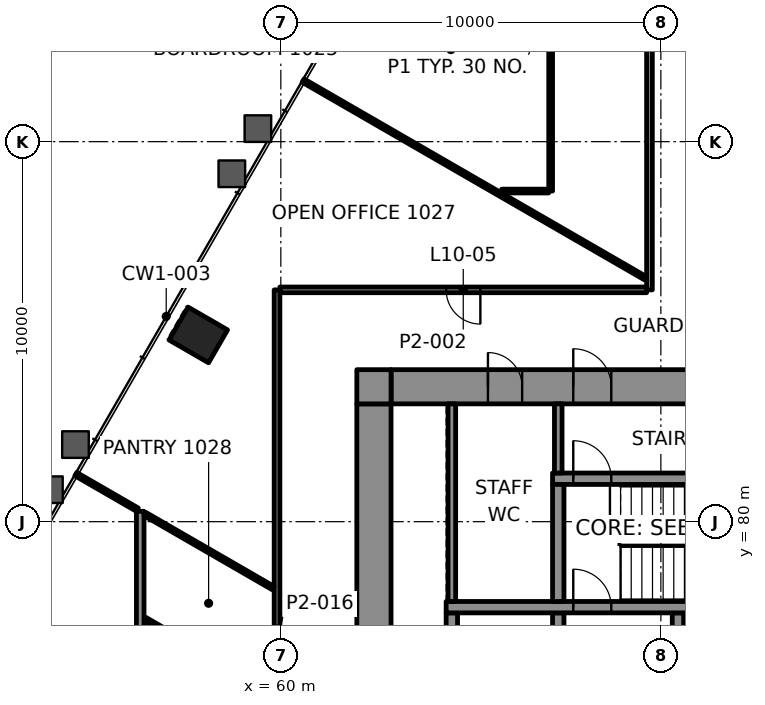
"""IFC4 building model, lengths in metres.
Left out: names, types, materials, properties, quantities, classifications, styles, units other than length and angle.
Written with IfcOpenShell. Run it as: python <this file> out.ifc"""

import sys

from ifc_helpers import new_model, si_unit, direction, frame, frame_2d, origin, origin_2d, place, context, subcontext, project, spatial, rectangle, extrude, element, fill, save


model = new_model("IFC4")
c1 = context("Model", 3, precision=1e-05, world=origin(), true_north=direction((0.0, 1.0)))
c2 = subcontext(c1, "Body", "Model", "MODEL_VIEW")
j1 = project(units=[si_unit("LENGTHUNIT", "METRE"), si_unit("PLANEANGLEUNIT", "RADIAN")], contexts=[c1])
p1 = place(None, origin())
s1 = spatial("IfcSite", under=j1, at=p1, CompositionType="ELEMENT")
p2 = place(p1, origin())
s2 = spatial("IfcBuilding", under=s1, at=p2, CompositionType="ELEMENT")
p3 = place(p2, frame((0.0, 0.0, 48.4)))
s3 = spatial("IfcBuildingStorey", under=s2, at=p3, CompositionType="ELEMENT", Elevation=48.4)
p4 = place(p3, frame((57.829, 84.914, -0.0), z_axis=(0.0, 0.0, 1.0), x_axis=(-0.5, -0.866025403784, 0.0)))
e1 = element("IfcColumn", 1, at=p4, inside=s3, PredefinedType="COLUMN", context=c2, shape_type="SweptSolid", body=[
    extrude(rectangle(XDim=1.0, YDim=1.2, at=origin_2d()), origin(), (0.0, 0.0, 1.0), 4.2),
])
p5 = place(p3, frame((62.9, 83.55, 0.0), z_axis=(0.0, 0.0, 1.0), x_axis=(1.0, 0.0, 0.0)))
e2 = element("IfcWall", 2, at=p5, inside=s3, PredefinedType="SHEAR", context=c2, shape_type="SweptSolid", body=[
    extrude(rectangle(XDim=25.1, YDim=0.9, at=frame_2d((12.55, 0.0))), origin(), (0.0, 0.0, 1.0), 4.0),
])
p6 = place(p5, frame((4.795, 0.0, 0.0)))
e3 = element("IfcOpeningElement", 3, at=p6, cuts=e2, PredefinedType="OPENING", context=c2, shape_type="SweptSolid", body=[
    extrude(rectangle(XDim=1.0, YDim=2.1, at=frame_2d((0.5, 1.05))), frame((0.0, 0.46, 0.0), z_axis=(0.0, -1.0, 0.0), x_axis=(1.0, 0.0, 0.0)), (0.0, 0.0, 1.0), 0.92),
])
p7 = place(p5, frame((18.605, 0.0, 0.0)))
e4 = element("IfcOpeningElement", 4, at=p7, cuts=e2, PredefinedType="OPENING", context=c2, shape_type="SweptSolid", body=[
    extrude(rectangle(XDim=1.0, YDim=2.1, at=frame_2d((0.5, 1.05))), frame((0.0, 0.46, 0.0), z_axis=(0.0, -1.0, 0.0), x_axis=(1.0, 0.0, 0.0)), (0.0, 0.0, 1.0), 0.92),
])
p8 = place(p5, frame((2.55, 0.0, 0.0)))
e5 = element("IfcOpeningElement", 5, at=p8, cuts=e2, PredefinedType="OPENING", context=c2, shape_type="SweptSolid", body=[
    extrude(rectangle(XDim=0.9, YDim=2.1, at=frame_2d((0.45, 1.05))), frame((0.0, 0.46, 0.0), z_axis=(0.0, -1.0, 0.0), x_axis=(1.0, 0.0, 0.0)), (0.0, 0.0, 1.0), 0.92),
])
p9 = place(p5, frame((11.75, 0.0, 0.0)))
e6 = element("IfcOpeningElement", 6, at=p9, cuts=e2, PredefinedType="OPENING", context=c2, shape_type="SweptSolid", body=[
    extrude(rectangle(XDim=0.9, YDim=2.1, at=frame_2d((0.45, 1.05))), frame((0.0, 0.46, 0.0), z_axis=(0.0, -1.0, 0.0), x_axis=(1.0, 0.0, 0.0)), (0.0, 0.0, 1.0), 0.92),
])
p10 = place(p5, frame((21.65, 0.0, 0.0)))
e7 = element("IfcOpeningElement", 7, at=p10, cuts=e2, PredefinedType="OPENING", context=c2, shape_type="SweptSolid", body=[
    extrude(rectangle(XDim=0.9, YDim=2.1, at=frame_2d((0.45, 1.05))), frame((0.0, 0.46, 0.0), z_axis=(0.0, -1.0, 0.0), x_axis=(1.0, 0.0, 0.0)), (0.0, 0.0, 1.0), 0.92),
])
p11 = place(p3, frame((62.45, 66.9, 0.0), z_axis=(0.0, 0.0, 1.0), x_axis=(0.0, 1.0, 0.0)))
e8 = element("IfcWall", 8, at=p11, inside=s3, PredefinedType="SHEAR", context=c2, shape_type="SweptSolid", body=[
    extrude(rectangle(XDim=16.2, YDim=0.9, at=frame_2d((8.1, 0.0))), origin(), (0.0, 0.0, 1.0), 4.0),
])
p12 = place(p11, frame((5.5, 0.0, 0.0)))
e9 = element("IfcOpeningElement", 9, at=p12, cuts=e8, PredefinedType="OPENING", context=c2, shape_type="SweptSolid", body=[
    extrude(rectangle(XDim=1.8, YDim=2.1, at=frame_2d((0.9, 1.05))), frame((0.0, 0.46, 0.0), z_axis=(0.0, -1.0, 0.0), x_axis=(1.0, 0.0, 0.0)), (0.0, 0.0, 1.0), 0.92),
])
for number, where, z_axis, x_axis in (
    (10, (64.5, 75.0, 0.0), (0.0, 0.0, 1.0), (0.0, 1.0, 0.0)),
    (11, (67.3, 75.0, 0.0), (0.0, 0.0, 1.0), (0.0, 1.0, 0.0)),
):
    element("IfcWall", number, at=place(p3, frame(where, z_axis=z_axis, x_axis=x_axis)), inside=s3, PredefinedType="SHEAR", context=c2, shape_type="SweptSolid", body=[
        extrude(rectangle(XDim=2.6, YDim=0.3, at=frame_2d((1.3, 0.0))), origin(), (0.0, 0.0, 1.0), 4.0),
    ])
p13 = place(p3, frame((70.45, 75.0, 0.0), z_axis=(0.0, 0.0, 1.0), x_axis=(0.0, 1.0, 0.0)))
e12 = element("IfcWall", 12, at=p13, inside=s3, PredefinedType="SHEAR", context=c2, shape_type="SweptSolid", body=[
    extrude(rectangle(XDim=2.6, YDim=0.3, at=frame_2d((1.3, 0.0))), origin(), (0.0, 0.0, 1.0), 4.0),
])
p14 = place(p13, frame((0.15, 0.0, 0.0)))
e13 = element("IfcOpeningElement", 13, at=p14, cuts=e12, PredefinedType="OPENING", context=c2, shape_type="SweptSolid", body=[
    extrude(rectangle(XDim=1.1, YDim=2.1, at=frame_2d((0.55, 1.05))), frame((0.0, 0.16, 0.0), z_axis=(0.0, -1.0, 0.0), x_axis=(1.0, 0.0, 0.0)), (0.0, 0.0, 1.0), 0.32),
])
p15 = place(p3, frame((64.35, 77.75, 0.0), z_axis=(0.0, 0.0, 1.0), x_axis=(1.0, 0.0, 0.0)))
e14 = element("IfcWall", 14, at=p15, inside=s3, PredefinedType="SHEAR", context=c2, shape_type="SweptSolid", body=[
    extrude(rectangle(XDim=22.75, YDim=0.3, at=frame_2d((11.375, 0.0))), origin(), (0.0, 0.0, 1.0), 4.0),
])
p16 = place(p15, frame((3.345, 0.0, 0.0)))
e15 = element("IfcOpeningElement", 15, at=p16, cuts=e14, PredefinedType="OPENING", context=c2, shape_type="SweptSolid", body=[
    extrude(rectangle(XDim=1.0, YDim=2.1, at=frame_2d((0.5, 1.05))), frame((0.0, 0.16, 0.0), z_axis=(0.0, -1.0, 0.0), x_axis=(1.0, 0.0, 0.0)), (0.0, 0.0, 1.0), 0.32),
])
p17 = place(p3, frame((67.15, 81.13, 0.0), z_axis=(0.0, 0.0, 1.0), x_axis=(1.0, 0.0, 0.0)))
e16 = element("IfcWall", 16, at=p17, inside=s3, PredefinedType="SHEAR", context=c2, shape_type="SweptSolid", body=[
    extrude(rectangle(XDim=6.91, YDim=0.3, at=frame_2d((3.455, 0.0))), origin(), (0.0, 0.0, 1.0), 4.0),
])
p18 = place(p17, frame((0.545, 0.0, 0.0)))
e17 = element("IfcOpeningElement", 17, at=p18, cuts=e16, PredefinedType="OPENING", context=c2, shape_type="SweptSolid", body=[
    extrude(rectangle(XDim=1.0, YDim=2.1, at=frame_2d((0.5, 1.05))), frame((0.0, 0.16, 0.0), z_axis=(0.0, -1.0, 0.0), x_axis=(1.0, 0.0, 0.0)), (0.0, 0.0, 1.0), 0.32),
])
p19 = place(p3, frame((67.3, 77.9, 0.0), z_axis=(0.0, 0.0, 1.0), x_axis=(0.0, 1.0, 0.0)))
e18 = element("IfcWall", 18, at=p19, inside=s3, PredefinedType="SHEAR", context=c2, shape_type="SweptSolid", body=[
    extrude(rectangle(XDim=3.08, YDim=0.3, at=frame_2d((1.54, 0.0))), origin(), (0.0, 0.0, 1.0), 4.0),
])
p20 = place(p3, frame((62.0, 83.55, 0.0), z_axis=(0.0, 0.0, 1.0), x_axis=(1.0, 0.0, 0.0)))
e19 = element("IfcWall", 19, at=p20, inside=s3, PredefinedType="SHEAR", context=c2, shape_type="SweptSolid", body=[
    extrude(rectangle(XDim=0.9, YDim=0.9, at=frame_2d((0.45, 0.0))), origin(), (0.0, 0.0, 1.0), 4.0),
])
p21 = place(p3, frame((69.625, 86.1, 0.0), z_axis=(0.0, 0.0, 1.0), x_axis=(-1.0, 0.0, 0.0)))
e20 = element("IfcWall", 20, at=p21, inside=s3, PredefinedType="PARTITIONING", context=c2, shape_type="SweptSolid", body=[
    extrude(rectangle(XDim=9.649, YDim=0.15, at=frame_2d((4.825, 0.0))), origin(), (0.0, 0.0, 1.0), 3.4),
])
p22 = place(p21, frame((4.375, 0.0, 0.0)))
e21 = element("IfcOpeningElement", 21, at=p22, cuts=e20, PredefinedType="OPENING", context=c2, shape_type="SweptSolid", body=[
    extrude(rectangle(XDim=0.9, YDim=2.1, at=frame_2d((0.45, 1.05))), frame((0.0, 0.085, 0.0), z_axis=(0.0, -1.0, 0.0), x_axis=(1.0, 0.0, 0.0)), (0.0, 0.0, 1.0), 0.17),
])
p23 = place(p3, frame((65.812, 88.7, 0.0), z_axis=(0.0, 0.0, 1.0), x_axis=(1.0, 0.0, 0.0)))
e22 = element("IfcWall", 22, at=p23, inside=s3, PredefinedType="PARTITIONING", context=c2, shape_type="SweptSolid", body=[
    extrude(rectangle(XDim=1.238, YDim=0.1, at=frame_2d((0.619, 0.0))), origin(), (0.0, 0.0, 1.0), 3.4),
])
p24 = place(p3, frame((69.7, 86.1, 0.0), z_axis=(0.0, 0.0, 1.0), x_axis=(0.0, 1.0, 0.0)))
e23 = element("IfcWall", 23, at=p24, inside=s3, PredefinedType="PARTITIONING", context=c2, shape_type="SweptSolid", body=[
    extrude(rectangle(XDim=10.6, YDim=0.15, at=frame_2d((5.3, 0.0))), origin(), (0.0, 0.0, 1.0), 3.4),
])
p25 = place(p3, frame((67.1, 88.7, 0.0), z_axis=(0.0, 0.0, 1.0), x_axis=(0.0, 1.0, 0.0)))
e24 = element("IfcWall", 24, at=p25, inside=s3, PredefinedType="PARTITIONING", context=c2, shape_type="SweptSolid", body=[
    extrude(rectangle(XDim=10.6, YDim=0.1, at=frame_2d((5.3, 0.0))), origin(), (0.0, 0.0, 1.0), 3.4),
])
p26 = place(p3, frame((59.9, 67.321, 0.0), z_axis=(0.0, 0.0, 1.0), x_axis=(0.0, 1.0, 0.0)))
e25 = element("IfcWall", 25, at=p26, inside=s3, PredefinedType="PARTITIONING", context=c2, shape_type="SweptSolid", body=[
    extrude(rectangle(XDim=18.778, YDim=0.15, at=frame_2d((9.389, 0.0))), origin(), (0.0, 0.0, 1.0), 3.4),
])
p27 = place(p26, frame((3.519, 0.0, 0.0)))
e26 = element("IfcOpeningElement", 26, at=p27, cuts=e25, PredefinedType="OPENING", context=c2, shape_type="SweptSolid", body=[
    extrude(rectangle(XDim=0.9, YDim=2.1, at=frame_2d((0.45, 1.05))), frame((0.0, 0.085, 0.0), z_axis=(0.0, -1.0, 0.0), x_axis=(1.0, 0.0, 0.0)), (0.0, 0.0, 1.0), 0.17),
])
p28 = place(p26, frame((6.281, 0.0, 0.0)))
e27 = element("IfcOpeningElement", 27, at=p28, cuts=e25, PredefinedType="OPENING", context=c2, shape_type="SweptSolid", body=[
    extrude(rectangle(XDim=0.9, YDim=2.1, at=frame_2d((0.45, 1.05))), frame((0.0, 0.085, 0.0), z_axis=(0.0, -1.0, 0.0), x_axis=(1.0, 0.0, 0.0)), (0.0, 0.0, 1.0), 0.17),
])
p29 = place(p26, frame((9.042, 0.0, 0.0)))
e28 = element("IfcOpeningElement", 28, at=p29, cuts=e25, PredefinedType="OPENING", context=c2, shape_type="SweptSolid", body=[
    extrude(rectangle(XDim=0.9, YDim=2.1, at=frame_2d((0.45, 1.05))), frame((0.0, 0.085, 0.0), z_axis=(0.0, -1.0, 0.0), x_axis=(1.0, 0.0, 0.0)), (0.0, 0.0, 1.0), 0.17),
])
p30 = place(p3, frame((56.3, 71.988, 0.0), z_axis=(0.0, 0.0, 1.0), x_axis=(0.0, 1.0, 0.0)))
e29 = element("IfcWall", 29, at=p30, inside=s3, PredefinedType="PARTITIONING", context=c2, shape_type="SweptSolid", body=[
    extrude(rectangle(XDim=8.284, YDim=0.2, at=frame_2d((4.142, 0.0))), origin(), (0.0, 0.0, 1.0), 3.4),
])
p31 = place(p3, frame((69.599, 86.404, 0.0), z_axis=(0.0, 0.0, 1.0), x_axis=(-0.866034815185, 0.499983698621, 0.0)))
e30 = element("IfcWall", 30, at=p31, inside=s3, PredefinedType="PARTITIONING", context=c2, shape_type="SweptSolid", body=[
    extrude(rectangle(XDim=10.408, YDim=0.1, at=frame_2d((5.204, 0.0))), origin(), (0.0, 0.0, 1.0), 3.165),
])
p32 = place(p3, frame((59.799, 78.252, 0.0), z_axis=(0.0, 0.0, 1.0), x_axis=(-0.866036349784, 0.499981040493, 0.0)))
e31 = element("IfcWall", 31, at=p32, inside=s3, PredefinedType="PARTITIONING", context=c2, shape_type="SweptSolid", body=[
    extrude(rectangle(XDim=3.896, YDim=0.1, at=frame_2d((1.948, 0.0))), origin(), (0.0, 0.0, 1.0), 3.4),
])
p33 = place(p3, frame((59.799, 75.49, 0.0), z_axis=(0.0, 0.0, 1.0), x_axis=(-0.866043624834, 0.499968438888, 0.0)))
e32 = element("IfcWall", 32, at=p33, inside=s3, PredefinedType="PARTITIONING", context=c2, shape_type="SweptSolid", body=[
    extrude(rectangle(XDim=3.895, YDim=0.1, at=frame_2d((1.947, 0.0))), origin(), (0.0, 0.0, 1.0), 3.4),
])
p34 = place(p3, frame((56.225, 80.316, 0.0), z_axis=(0.0, 0.0, 1.0), x_axis=(-0.86600952399, 0.500027503603, 0.0)))
e33 = element("IfcWall", 33, at=p34, inside=s3, PredefinedType="PARTITIONING", context=c2, shape_type="SweptSolid", body=[
    extrude(rectangle(XDim=1.871, YDim=0.1, at=frame_2d((0.935, 0.0))), origin(), (0.0, 0.0, 1.0), 3.165),
])
p35 = place(p3, frame((64.5, 77.9, 0.0), z_axis=(0.0, 0.0, 1.0), x_axis=(0.0, 1.0, 0.0)))
e34 = element("IfcWall", 34, at=p35, inside=s3, PredefinedType="PARTITIONING", context=c2, shape_type="SweptSolid", body=[
    extrude(rectangle(XDim=5.2, YDim=0.2, at=frame_2d((2.6, 0.0))), origin(), (0.0, 0.0, 1.0), 4.0),
])
p36 = place(p3, frame((67.3, 81.28, 0.0), z_axis=(0.0, 0.0, 1.0), x_axis=(0.0, 1.0, 0.0)))
e35 = element("IfcWall", 35, at=p36, inside=s3, PredefinedType="PARTITIONING", context=c2, shape_type="SweptSolid", body=[
    extrude(rectangle(XDim=1.82, YDim=0.2, at=frame_2d((0.91, 0.0))), origin(), (0.0, 0.0, 1.0), 4.0),
])
p37 = place(p22, origin())
e36 = element("IfcDoor", 36, at=p37, inside=s3, OperationType="SINGLE_SWING_LEFT", PredefinedType="DOOR", context=c2, shape_type="SweptSolid", body=[
    extrude(rectangle(XDim=0.9, YDim=2.1, at=frame_2d((0.45, 1.05))), frame((0.0, 0.025, 0.0), z_axis=(0.0, -1.0, 0.0), x_axis=(1.0, 0.0, 0.0)), (0.0, 0.0, 1.0), 0.05),
])
fill(e21, e36)
p38 = place(p16, origin())
e37 = element("IfcDoor", 37, at=p38, inside=s3, OperationType="SINGLE_SWING_LEFT", PredefinedType="DOOR", context=c2, shape_type="SweptSolid", body=[
    extrude(rectangle(XDim=1.0, YDim=2.1, at=frame_2d((0.5, 1.05))), frame((0.0, 0.025, 0.0), z_axis=(0.0, -1.0, 0.0), x_axis=(1.0, 0.0, 0.0)), (0.0, 0.0, 1.0), 0.05),
])
fill(e15, e37)
p39 = place(p18, origin())
e38 = element("IfcDoor", 38, at=p39, inside=s3, OperationType="SINGLE_SWING_RIGHT", PredefinedType="DOOR", context=c2, shape_type="SweptSolid", body=[
    extrude(rectangle(XDim=1.0, YDim=2.1, at=frame_2d((0.5, 1.05))), frame((0.0, 0.025, 0.0), z_axis=(0.0, -1.0, 0.0), x_axis=(1.0, 0.0, 0.0)), (0.0, 0.0, 1.0), 0.05),
])
fill(e17, e38)
p40 = place(p6, origin())
e39 = element("IfcDoor", 39, at=p40, inside=s3, OperationType="SINGLE_SWING_LEFT", PredefinedType="DOOR", context=c2, shape_type="SweptSolid", body=[
    extrude(rectangle(XDim=1.0, YDim=2.1, at=frame_2d((0.5, 1.05))), frame((0.0, 0.17, 0.0), z_axis=(0.0, -1.0, 0.0), x_axis=(1.0, 0.0, 0.0)), (0.0, 0.0, 1.0), 0.34),
])
fill(e3, e39)
p41 = place(p8, origin())
e40 = element("IfcDoor", 40, at=p41, inside=s3, OperationType="SINGLE_SWING_RIGHT", PredefinedType="DOOR", context=c2, shape_type="SweptSolid", body=[
    extrude(rectangle(XDim=0.9, YDim=2.1, at=frame_2d((0.45, 1.05))), frame((0.0, 0.17, 0.0), z_axis=(0.0, -1.0, 0.0), x_axis=(1.0, 0.0, 0.0)), (0.0, 0.0, 1.0), 0.34),
])
fill(e5, e40)
save(model, sys.argv[1])
